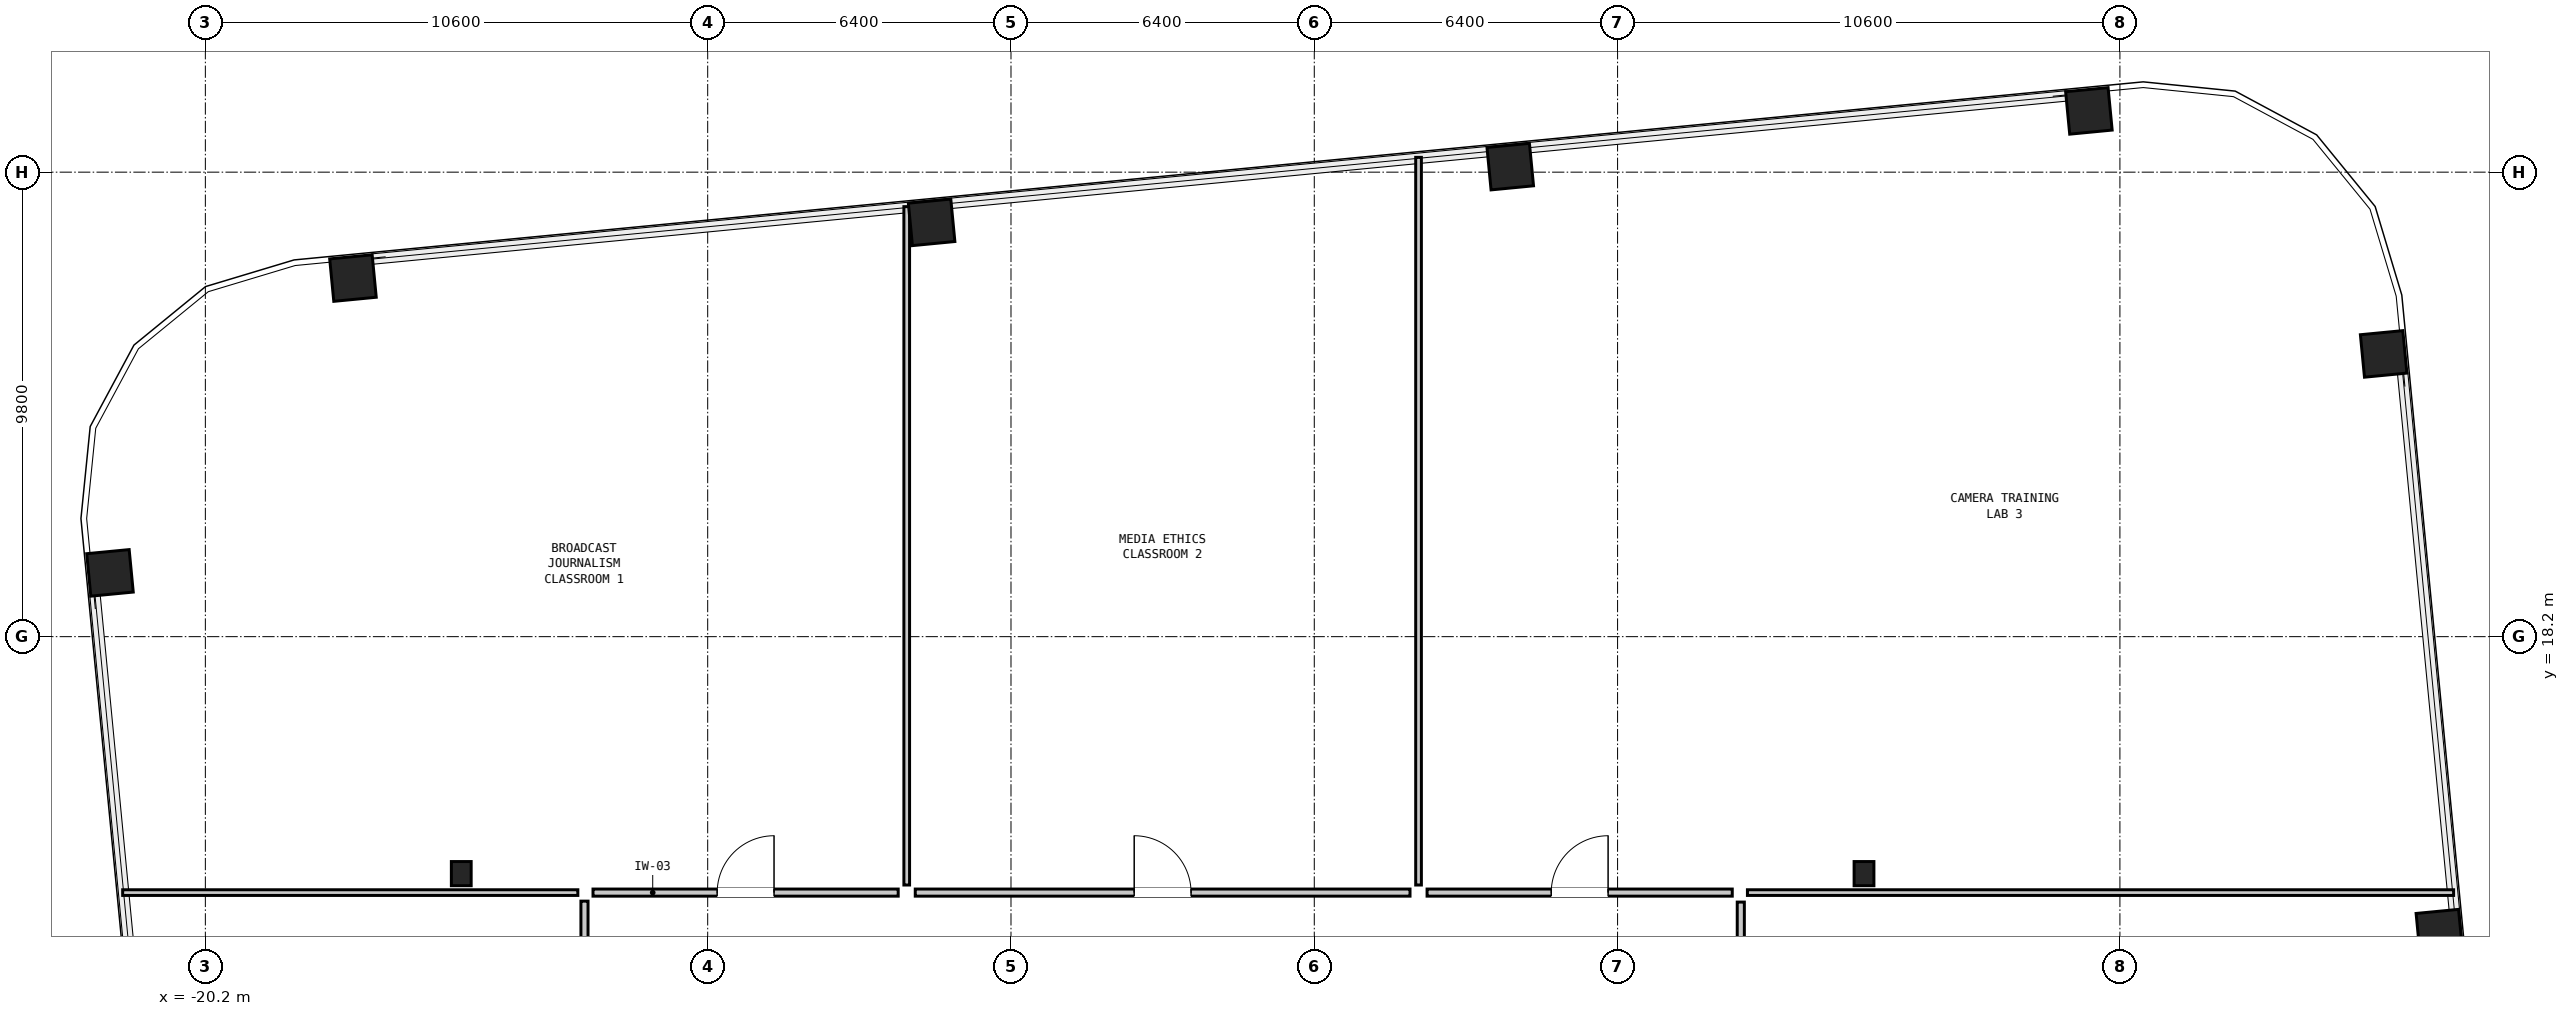
"""IFC4 building model, lengths in metres.
Left out: names, types, materials, properties, quantities, classifications, styles, units other than length and angle.
Written with IfcOpenShell. Run it as: python <this file> out.ifc"""

import sys

from ifc_helpers import new_model, si_unit, direction, frame, frame_2d, origin, origin_2d, place, context, subcontext, project, spatial, rectangle, hollow_rectangle, i_section, extrude, element, fill, save


model = new_model("IFC4")
c1 = context("Model", 3, precision=1e-05, world=origin(), true_north=direction((0.0, 1.0)))
c2 = subcontext(c1, "Body", "Model", "MODEL_VIEW")
j1 = project(units=[si_unit("LENGTHUNIT", "METRE"), si_unit("PLANEANGLEUNIT", "RADIAN")], contexts=[c1])
p1 = place(None, origin())
s1 = spatial("IfcSite", under=j1, at=p1, CompositionType="ELEMENT")
p2 = place(p1, origin())
s2 = spatial("IfcBuilding", under=s1, at=p2, CompositionType="ELEMENT")
p3 = place(p2, frame((0.0, 0.0, 96.9)))
s3 = spatial("IfcBuildingStorey", under=s2, at=p3, CompositionType="ELEMENT", Elevation=96.9)
for number, where, z_axis, x_axis in (
    (1, (26.941, 11.955, 0.0), (0.0, 0.0, 1.0), (-0.096, 0.995, 0.0)),
    (2, (25.765, 24.165, 0.0), (0.0, 0.0, 1.0), (-0.096, 0.995, 0.0)),
    (3, (19.545, 29.292, 0.0), (0.0, 0.0, 1.0), (0.995, 0.096, 0.0)),
    (4, (7.335, 28.117, 0.0), (0.0, 0.0, 1.0), (0.995, 0.096, 0.0)),
    (5, (-4.875, 26.941, 0.0), (0.0, 0.0, 1.0), (0.995, 0.096, 0.0)),
    (6, (-17.085, 25.765, 0.0), (0.0, 0.0, 1.0), (0.995, 0.096, 0.0)),
    (7, (-22.213, 19.545, 0.0), (0.0, 0.0, 1.0), (-0.096, 0.995, 0.0)),
):
    element("IfcColumn", number, at=place(p3, frame(where, z_axis=z_axis, x_axis=x_axis)), inside=s3, PredefinedType="COLUMN", context=c2, shape_type="SweptSolid", body=[
        extrude(hollow_rectangle(XDim=0.9, YDim=0.9, WallThickness=0.055, at=origin_2d()), origin(), (0.0, 0.0, 1.0), 4.35),
    ])
for number, where, z_axis, x_axis in (
    (8, (-14.8, 13.2, 0.0), (0.0, 0.0, 1.0), (1.0, 0.0, 0.0)),
    (9, (14.8, 13.2, 0.0), (0.0, 0.0, 1.0), (1.0, 0.0, 0.0)),
):
    element("IfcColumn", number, at=place(p3, frame(where, z_axis=z_axis, x_axis=x_axis)), inside=s3, PredefinedType="COLUMN", context=c2, shape_type="SweptSolid", body=[
        extrude(i_section(OverallWidth=0.418, OverallDepth=0.51, WebThickness=0.042, FlangeThickness=0.068, at=origin_2d()), origin(), (0.0, 0.0, 1.0), 4.35),
    ])
p4 = place(p3, frame((-21.945, 12.8, 0.0), z_axis=(0.0, 0.0, 1.0), x_axis=(1.0, 0.0, 0.0)))
e10 = element("IfcWall", 10, at=p4, inside=s3, PredefinedType="PARTITIONING", context=c2, shape_type="SweptSolid", body=[
    extrude(rectangle(XDim=9.605, YDim=0.12, at=frame_2d((4.802, 0.0))), origin(), (0.0, 0.0, 1.0), 4.07),
])
p5 = place(p3, frame((12.34, 12.8, 0.0), z_axis=(0.0, 0.0, 1.0), x_axis=(1.0, 0.0, 0.0)))
e11 = element("IfcWall", 11, at=p5, inside=s3, PredefinedType="PARTITIONING", context=c2, shape_type="SweptSolid", body=[
    extrude(rectangle(XDim=14.902, YDim=0.12, at=frame_2d((7.451, 0.0))), origin(), (0.0, 0.0, 1.0), 4.07),
])
p6 = place(p3, frame((-5.4, 12.96, 0.0), z_axis=(0.0, 0.0, 1.0), x_axis=(0.0, 1.0, 0.0)))
e12 = element("IfcWall", 12, at=p6, inside=s3, PredefinedType="PARTITIONING", context=c2, shape_type="SweptSolid", body=[
    extrude(rectangle(XDim=14.312, YDim=0.12, at=frame_2d((7.156, 0.0))), origin(), (0.0, 0.0, 1.0), 4.07),
])
p7 = place(p3, frame((5.4, 12.96, 0.0), z_axis=(0.0, 0.0, 1.0), x_axis=(0.0, 1.0, 0.0)))
e13 = element("IfcWall", 13, at=p7, inside=s3, PredefinedType="PARTITIONING", context=c2, shape_type="SweptSolid", body=[
    extrude(rectangle(XDim=15.352, YDim=0.12, at=frame_2d((7.676, 0.0))), origin(), (0.0, 0.0, 1.0), 4.07),
])
p8 = place(p3, frame((-12.02, 12.8, 0.0), z_axis=(0.0, 0.0, 1.0), x_axis=(1.0, 0.0, 0.0)))
e14 = element("IfcWall", 14, at=p8, inside=s3, PredefinedType="PARTITIONING", context=c2, shape_type="SweptSolid", body=[
    extrude(rectangle(XDim=6.44, YDim=0.15, at=frame_2d((3.22, 0.0))), origin(), (0.0, 0.0, 1.0), 4.07),
])
p9 = place(p8, frame((2.62, 0.0, 0.0)))
e15 = element("IfcOpeningElement", 15, at=p9, cuts=e14, PredefinedType="OPENING", context=c2, shape_type="SweptSolid", body=[
    extrude(rectangle(XDim=1.2, YDim=2.1, at=frame_2d((0.6, 1.05))), frame((0.0, 0.087, 0.0), z_axis=(0.0, -1.0, 0.0), x_axis=(1.0, 0.0, 0.0)), (0.0, 0.0, 1.0), 0.174),
])
p10 = place(p3, frame((-5.22, 12.8, 0.0), z_axis=(0.0, 0.0, 1.0), x_axis=(1.0, 0.0, 0.0)))
e16 = element("IfcWall", 16, at=p10, inside=s3, PredefinedType="PARTITIONING", context=c2, shape_type="SweptSolid", body=[
    extrude(rectangle(XDim=10.44, YDim=0.15, at=frame_2d((5.22, 0.0))), origin(), (0.0, 0.0, 1.0), 4.07),
])
p11 = place(p10, frame((4.62, 0.0, 0.0)))
e17 = element("IfcOpeningElement", 17, at=p11, cuts=e16, PredefinedType="OPENING", context=c2, shape_type="SweptSolid", body=[
    extrude(rectangle(XDim=1.2, YDim=2.1, at=frame_2d((0.6, 1.05))), frame((0.0, 0.087, 0.0), z_axis=(0.0, -1.0, 0.0), x_axis=(1.0, 0.0, 0.0)), (0.0, 0.0, 1.0), 0.174),
])
p12 = place(p3, frame((5.58, 12.8, 0.0), z_axis=(0.0, 0.0, 1.0), x_axis=(1.0, 0.0, 0.0)))
e18 = element("IfcWall", 18, at=p12, inside=s3, PredefinedType="PARTITIONING", context=c2, shape_type="SweptSolid", body=[
    extrude(rectangle(XDim=6.44, YDim=0.15, at=frame_2d((3.22, 0.0))), origin(), (0.0, 0.0, 1.0), 4.07),
])
p13 = place(p12, frame((2.62, 0.0, 0.0)))
e19 = element("IfcOpeningElement", 19, at=p13, cuts=e18, PredefinedType="OPENING", context=c2, shape_type="SweptSolid", body=[
    extrude(rectangle(XDim=1.2, YDim=2.1, at=frame_2d((0.6, 1.05))), frame((0.0, 0.087, 0.0), z_axis=(0.0, -1.0, 0.0), x_axis=(1.0, 0.0, 0.0)), (0.0, 0.0, 1.0), 0.174),
])
p14 = place(p3, frame((-12.2, 0.18, 0.0), z_axis=(0.0, 0.0, 1.0), x_axis=(0.0, 1.0, 0.0)))
e20 = element("IfcWall", 20, at=p14, inside=s3, PredefinedType="PARTITIONING", context=c2, shape_type="SweptSolid", body=[
    extrude(rectangle(XDim=12.44, YDim=0.15, at=frame_2d((6.22, 0.0))), origin(), (0.0, 0.0, 1.0), 2.25),
])
p15 = place(p14, frame((5.62, 0.0, 0.0)))
e21 = element("IfcOpeningElement", 21, at=p15, cuts=e20, PredefinedType="OPENING", context=c2, shape_type="SweptSolid", body=[
    extrude(rectangle(XDim=1.2, YDim=2.1, at=frame_2d((0.6, 1.05))), frame((0.0, 0.087, 0.0), z_axis=(0.0, -1.0, 0.0), x_axis=(1.0, 0.0, 0.0)), (0.0, 0.0, 1.0), 0.174),
])
p16 = place(p3, frame((12.2, 3.8, 0.0), z_axis=(0.0, 0.0, 1.0), x_axis=(0.0, 1.0, 0.0)))
e22 = element("IfcWall", 22, at=p16, inside=s3, PredefinedType="PARTITIONING", context=c2, shape_type="SweptSolid", body=[
    extrude(rectangle(XDim=8.8, YDim=0.15, at=frame_2d((4.4, 0.0))), origin(), (0.0, 0.0, 1.0), 4.07),
])
p17 = place(p16, frame((3.925, 0.0, 0.0)))
e23 = element("IfcOpeningElement", 23, at=p17, cuts=e22, PredefinedType="OPENING", context=c2, shape_type="SweptSolid", body=[
    extrude(rectangle(XDim=0.95, YDim=2.1, at=frame_2d((0.475, 1.05))), frame((0.0, 0.087, 0.0), z_axis=(0.0, -1.0, 0.0), x_axis=(1.0, 0.0, 0.0)), (0.0, 0.0, 1.0), 0.174),
])
p18 = place(p9, origin())
e24 = element("IfcDoor", 24, at=p18, inside=s3, OperationType="SINGLE_SWING_RIGHT", PredefinedType="DOOR", context=c2, shape_type="SweptSolid", body=[
    extrude(rectangle(XDim=1.2, YDim=2.1, at=frame_2d((0.6, 1.05))), frame((0.0, 0.025, 0.0), z_axis=(0.0, -1.0, 0.0), x_axis=(1.0, 0.0, 0.0)), (0.0, 0.0, 1.0), 0.05),
])
fill(e15, e24)
p19 = place(p11, origin())
e25 = element("IfcDoor", 25, at=p19, inside=s3, OperationType="SINGLE_SWING_LEFT", PredefinedType="DOOR", context=c2, shape_type="SweptSolid", body=[
    extrude(rectangle(XDim=1.2, YDim=2.1, at=frame_2d((0.6, 1.05))), frame((0.0, 0.025, 0.0), z_axis=(0.0, -1.0, 0.0), x_axis=(1.0, 0.0, 0.0)), (0.0, 0.0, 1.0), 0.05),
])
fill(e17, e25)
p20 = place(p13, origin())
e26 = element("IfcDoor", 26, at=p20, inside=s3, OperationType="SINGLE_SWING_RIGHT", PredefinedType="DOOR", context=c2, shape_type="SweptSolid", body=[
    extrude(rectangle(XDim=1.2, YDim=2.1, at=frame_2d((0.6, 1.05))), frame((0.0, 0.025, 0.0), z_axis=(0.0, -1.0, 0.0), x_axis=(1.0, 0.0, 0.0)), (0.0, 0.0, 1.0), 0.05),
])
fill(e19, e26)
save(model, sys.argv[1])
